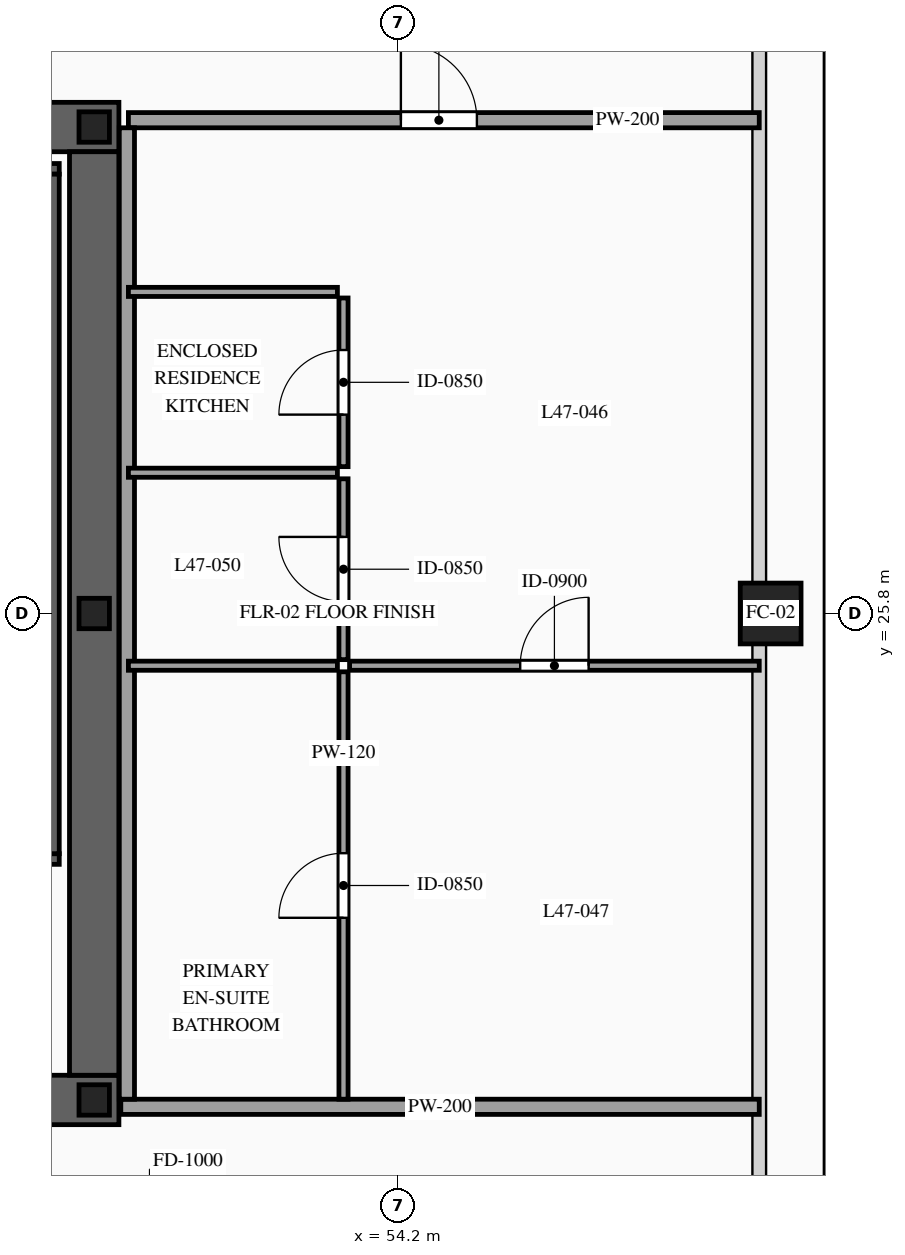
"""IFC4 building model, lengths in metres.
Left out: names, types, materials, properties, quantities, classifications, styles, units other than length and angle.
Written with IfcOpenShell. Run it as: python <this file> out.ifc"""

import sys

from ifc_helpers import new_model, si_unit, direction, frame, frame_2d, origin, origin_2d, place, context, subcontext, project, spatial, rectangle, hollow_rectangle, i_section, extrude, source, transform, mapped, element, fill, save


model = new_model("IFC4")
c1 = context("Model", 3, precision=1e-05, world=origin(), true_north=direction((0.0, 1.0)))
c2 = subcontext(c1, "Body", "Model", "MODEL_VIEW")
j1 = project(units=[si_unit("LENGTHUNIT", "METRE"), si_unit("PLANEANGLEUNIT", "RADIAN")], contexts=[c1])
p1 = place(None, origin())
s1 = spatial("IfcSite", under=j1, at=p1, CompositionType="ELEMENT")
p2 = place(p1, origin())
s2 = spatial("IfcBuilding", under=s1, at=p2, CompositionType="ELEMENT")
p3 = place(p2, frame((0.0, 0.0, 181.0)))
s3 = spatial("IfcBuildingStorey", under=s2, at=p3, CompositionType="ELEMENT", Elevation=181.0)
p4 = place(p3, frame((23.475, 19.4, 0.0), z_axis=(0.0, 0.0, 1.0), x_axis=(1.0, 0.0, 0.0)))
e1 = element("IfcWall", 1, at=p4, inside=s3, PredefinedType="SHEAR", context=c2, shape_type="SweptSolid", body=[
    extrude(rectangle(XDim=27.05, YDim=0.65, at=frame_2d((13.525, 0.0))), origin(), (0.0, 0.0, 1.0), 3.5),
])
p5 = place(p4, frame((1.975, 0.0, 0.0)))
e2 = element("IfcOpeningElement", 2, at=p5, cuts=e1, PredefinedType="OPENING", context=c2, shape_type="SweptSolid", body=[
    extrude(rectangle(XDim=1.1, YDim=2.2, at=frame_2d((0.55, 1.1))), frame((0.0, 0.34, 0.0), z_axis=(0.0, -1.0, 0.0), x_axis=(1.0, 0.0, 0.0)), (0.0, 0.0, 1.0), 0.68),
])
p6 = place(p4, frame((9.875, 0.0, 0.0)))
e3 = element("IfcOpeningElement", 3, at=p6, cuts=e1, PredefinedType="OPENING", context=c2, shape_type="SweptSolid", body=[
    extrude(rectangle(XDim=1.1, YDim=2.2, at=frame_2d((0.55, 1.1))), frame((0.0, 0.34, 0.0), z_axis=(0.0, -1.0, 0.0), x_axis=(1.0, 0.0, 0.0)), (0.0, 0.0, 1.0), 0.68),
])
p7 = place(p4, frame((23.075, 0.0, 0.0)))
e4 = element("IfcOpeningElement", 4, at=p7, cuts=e1, PredefinedType="OPENING", context=c2, shape_type="SweptSolid", body=[
    extrude(rectangle(XDim=1.1, YDim=2.2, at=frame_2d((0.55, 1.1))), frame((0.0, 0.34, 0.0), z_axis=(0.0, -1.0, 0.0), x_axis=(1.0, 0.0, 0.0)), (0.0, 0.0, 1.0), 0.68),
])
p8 = place(p4, frame((19.695, 0.0, 0.0)))
e5 = element("IfcOpeningElement", 5, at=p8, cuts=e1, PredefinedType="OPENING", context=c2, shape_type="SweptSolid", body=[
    extrude(rectangle(XDim=0.9, YDim=2.15, at=frame_2d((0.45, 1.075))), frame((0.0, 0.34, 0.0), z_axis=(0.0, -1.0, 0.0), x_axis=(1.0, 0.0, 0.0)), (0.0, 0.0, 1.0), 0.68),
])
p9 = place(p4, frame((18.255, 0.0, 0.0)))
e6 = element("IfcOpeningElement", 6, at=p9, cuts=e1, PredefinedType="OPENING", context=c2, shape_type="SweptSolid", body=[
    extrude(rectangle(XDim=0.9, YDim=2.15, at=frame_2d((0.45, 1.075))), frame((0.0, 0.34, 0.0), z_axis=(0.0, -1.0, 0.0), x_axis=(1.0, 0.0, 0.0)), (0.0, 0.0, 1.0), 0.68),
])
p10 = place(p3, frame((23.475, 32.2, 0.0), z_axis=(0.0, 0.0, 1.0), x_axis=(1.0, 0.0, 0.0)))
e7 = element("IfcWall", 7, at=p10, inside=s3, PredefinedType="SHEAR", context=c2, shape_type="SweptSolid", body=[
    extrude(rectangle(XDim=27.05, YDim=0.65, at=frame_2d((13.525, 0.0))), origin(), (0.0, 0.0, 1.0), 3.5),
])
p11 = place(p10, frame((4.595, 0.0, 0.0)))
e8 = element("IfcOpeningElement", 8, at=p11, cuts=e7, PredefinedType="OPENING", context=c2, shape_type="SweptSolid", body=[
    extrude(rectangle(XDim=0.9, YDim=2.15, at=frame_2d((0.45, 1.075))), frame((0.0, 0.34, 0.0), z_axis=(0.0, -1.0, 0.0), x_axis=(1.0, 0.0, 0.0)), (0.0, 0.0, 1.0), 0.68),
])
p12 = place(p10, frame((9.875, 0.0, 0.0)))
e9 = element("IfcOpeningElement", 9, at=p12, cuts=e7, PredefinedType="OPENING", context=c2, shape_type="SweptSolid", body=[
    extrude(rectangle(XDim=1.1, YDim=2.2, at=frame_2d((0.55, 1.1))), frame((0.0, 0.34, 0.0), z_axis=(0.0, -1.0, 0.0), x_axis=(1.0, 0.0, 0.0)), (0.0, 0.0, 1.0), 0.68),
])
p13 = place(p10, frame((15.725, 0.0, 0.0)))
e10 = element("IfcOpeningElement", 10, at=p13, cuts=e7, PredefinedType="OPENING", context=c2, shape_type="SweptSolid", body=[
    extrude(rectangle(XDim=1.1, YDim=2.2, at=frame_2d((0.55, 1.1))), frame((0.0, 0.34, 0.0), z_axis=(0.0, -1.0, 0.0), x_axis=(1.0, 0.0, 0.0)), (0.0, 0.0, 1.0), 0.68),
])
p14 = place(p10, frame((19.695, 0.0, 0.0)))
e11 = element("IfcOpeningElement", 11, at=p14, cuts=e7, PredefinedType="OPENING", context=c2, shape_type="SweptSolid", body=[
    extrude(rectangle(XDim=0.9, YDim=2.15, at=frame_2d((0.45, 1.075))), frame((0.0, 0.34, 0.0), z_axis=(0.0, -1.0, 0.0), x_axis=(1.0, 0.0, 0.0)), (0.0, 0.0, 1.0), 0.68),
])
m1 = source(origin(), c2, "Body", "SweptSolid", [
    extrude(rectangle(XDim=12.15, YDim=0.65, at=frame_2d((6.075, 0.0))), origin(), (0.0, 0.0, 1.0), 3.5),
])
p15 = place(p3, frame((50.2, 19.725, 0.0), z_axis=(0.0, 0.0, 1.0), x_axis=(0.0, 1.0, 0.0)))
e12 = element("IfcWall", 12, at=p15, inside=s3, PredefinedType="SHEAR", context=c2, shape_type="MappedRepresentation", body=[
    mapped(m1, transform((0.0, 0.0, 0.0), scale=1.0)),
])
m2 = source(origin(), c2, "Body", "SweptSolid", [
    extrude(i_section(OverallWidth=0.4, OverallDepth=0.4, WebThickness=0.013, FlangeThickness=0.021, at=origin_2d()), origin(), (0.0, 0.0, 1.0), 3.5),
])
for number, where, z_axis, x_axis in (
    (13, (50.2, 19.4, 0.0), (0.0, 0.0, 1.0), (1.0, 0.0, 0.0)),
    (14, (50.2, 25.8, 0.0), (0.0, 0.0, 1.0), (1.0, 0.0, 0.0)),
    (15, (50.2, 32.2, 0.0), (0.0, 0.0, 1.0), (1.0, 0.0, 0.0)),
):
    element("IfcColumn", number, at=place(p3, frame(where, z_axis=z_axis, x_axis=x_axis)), inside=s3, PredefinedType="COLUMN", context=c2, shape_type="MappedRepresentation", body=[
        mapped(m2, transform((0.0, 0.0, 0.0), scale=1.0)),
    ])
m3 = source(origin(), c2, "Body", "SweptSolid", [
    extrude(hollow_rectangle(XDim=0.8, YDim=0.8, WallThickness=0.036, at=origin_2d()), origin(), (0.0, 0.0, 1.0), 3.5),
])
p16 = place(p3, frame((59.1, 25.8, 0.0), z_axis=(0.0, 0.0, 1.0), x_axis=(1.0, 0.0, 0.0)))
e16 = element("IfcColumn", 16, at=p16, inside=s3, PredefinedType="COLUMN", context=c2, shape_type="MappedRepresentation", body=[
    mapped(m3, transform((0.0, 0.0, 0.0), scale=1.0)),
])
p17 = place(p3, frame((46.46, 22.57, 0.0), z_axis=(0.0, 0.0, 1.0), x_axis=(1.0, 0.0, 0.0)))
e17 = element("IfcWall", 17, at=p17, inside=s3, PredefinedType="SOLIDWALL", context=c2, shape_type="SweptSolid", body=[
    extrude(rectangle(XDim=3.28, YDim=0.14, at=frame_2d((1.64, 0.0))), origin(), (0.0, 0.0, 1.0), 3.28),
])
p18 = place(p17, frame((1.09, 0.0, 0.0)))
e18 = element("IfcOpeningElement", 18, at=p18, cuts=e17, PredefinedType="OPENING", context=c2, shape_type="SweptSolid", body=[
    extrude(rectangle(XDim=1.1, YDim=2.2, at=frame_2d((0.55, 1.1))), frame((0.0, 0.085, 0.0), z_axis=(0.0, -1.0, 0.0), x_axis=(1.0, 0.0, 0.0)), (0.0, 0.0, 1.0), 0.17),
])
m4 = source(origin(), c2, "Body", "SweptSolid", [
    extrude(rectangle(XDim=3.28, YDim=0.14, at=frame_2d((1.64, 0.0))), origin(), (0.0, 0.0, 1.0), 3.28),
])
p19 = place(p3, frame((46.46, 31.65, 0.0), z_axis=(0.0, 0.0, 1.0), x_axis=(1.0, 0.0, 0.0)))
e19 = element("IfcWall", 19, at=p19, inside=s3, PredefinedType="SOLIDWALL", context=c2, shape_type="MappedRepresentation", body=[
    mapped(m4, transform((0.0, 0.0, 0.0), scale=1.0)),
])
m5 = source(origin(), c2, "Body", "SweptSolid", [
    extrude(rectangle(XDim=8.94, YDim=0.14, at=frame_2d((4.47, 0.0))), origin(), (0.0, 0.0, 1.0), 3.28),
])
p20 = place(p3, frame((49.67, 22.64, 0.0), z_axis=(0.0, 0.0, 1.0), x_axis=(0.0, 1.0, 0.0)))
e20 = element("IfcWall", 20, at=p20, inside=s3, PredefinedType="SOLIDWALL", context=c2, shape_type="MappedRepresentation", body=[
    mapped(m5, transform((0.0, 0.0, 0.0), scale=1.0)),
])
p21 = place(p3, frame((50.65, 32.29, 0.0), z_axis=(0.0, 0.0, 1.0), x_axis=(1.0, 0.0, 0.0)))
e21 = element("IfcWall", 21, at=p21, inside=s3, PredefinedType="PARTITIONING", context=c2, shape_type="SweptSolid", body=[
    extrude(rectangle(XDim=8.3, YDim=0.2, at=frame_2d((4.15, 0.0))), origin(), (0.0, 0.0, 1.0), 2.775),
])
p22 = place(p21, frame((3.585, 0.0, 0.0)))
e22 = element("IfcOpeningElement", 22, at=p22, cuts=e21, PredefinedType="OPENING", context=c2, shape_type="SweptSolid", body=[
    extrude(rectangle(XDim=1.0, YDim=2.2, at=frame_2d((0.5, 1.1))), frame((0.0, 0.115, 0.0), z_axis=(0.0, -1.0, 0.0), x_axis=(1.0, 0.0, 0.0)), (0.0, 0.0, 1.0), 0.23),
])
m6 = source(origin(), c2, "Body", "SweptSolid", [
    extrude(rectangle(XDim=8.4, YDim=0.2, at=frame_2d((4.2, 0.0))), origin(), (0.0, 0.0, 1.0), 2.775),
])
p23 = place(p3, frame((50.55, 19.31, 0.0), z_axis=(0.0, 0.0, 1.0), x_axis=(1.0, 0.0, 0.0)))
e23 = element("IfcWall", 23, at=p23, inside=s3, PredefinedType="PARTITIONING", context=c2, shape_type="MappedRepresentation", body=[
    mapped(m6, transform((0.0, 0.0, 0.0), scale=1.0)),
])
m7 = source(origin(), c2, "Body", "SweptSolid", [
    extrude(rectangle(XDim=12.78, YDim=0.2, at=frame_2d((6.39, 0.0))), origin(), (0.0, 0.0, 1.0), 3.28),
])
p24 = place(p3, frame((50.63, 19.41, 0.0), z_axis=(0.0, 0.0, 1.0), x_axis=(0.0, 1.0, 0.0)))
e24 = element("IfcWall", 24, at=p24, inside=s3, PredefinedType="PARTITIONING", context=c2, shape_type="MappedRepresentation", body=[
    mapped(m7, transform((0.0, 0.0, 0.0), scale=1.0)),
])
m8 = source(origin(), c2, "Body", "SweptSolid", [
    extrude(rectangle(XDim=2.75, YDim=0.12, at=frame_2d((1.375, 0.0))), origin(), (0.0, 0.0, 1.0), 3.28),
])
for number, where, z_axis, x_axis in (
    (25, (50.65, 25.113, 0.0), (0.0, 0.0, 1.0), (1.0, 0.0, 0.0)),
    (26, (50.65, 27.652, 0.0), (0.0, 0.0, 1.0), (1.0, 0.0, 0.0)),
):
    element("IfcWall", number, at=place(p3, frame(where, z_axis=z_axis, x_axis=x_axis)), inside=s3, PredefinedType="PARTITIONING", context=c2, shape_type="MappedRepresentation", body=[
        mapped(m8, transform((0.0, 0.0, 0.0), scale=1.0)),
    ])
p25 = place(p3, frame((53.48, 25.193, 0.0), z_axis=(0.0, 0.0, 1.0), x_axis=(0.0, 1.0, 0.0)))
e27 = element("IfcWall", 27, at=p25, inside=s3, PredefinedType="PARTITIONING", context=c2, shape_type="SweptSolid", body=[
    extrude(rectangle(XDim=2.379, YDim=0.12, at=frame_2d((1.189, 0.0))), origin(), (0.0, 0.0, 1.0), 3.28),
])
p26 = place(p25, frame((0.764, 0.0, 0.0)))
e28 = element("IfcOpeningElement", 28, at=p26, cuts=e27, PredefinedType="OPENING", context=c2, shape_type="SweptSolid", body=[
    extrude(rectangle(XDim=0.85, YDim=2.1, at=frame_2d((0.425, 1.05))), frame((0.0, 0.075, 0.0), z_axis=(0.0, -1.0, 0.0), x_axis=(1.0, 0.0, 0.0)), (0.0, 0.0, 1.0), 0.15),
])
p27 = place(p3, frame((50.65, 30.031, 0.0), z_axis=(0.0, 0.0, 1.0), x_axis=(1.0, 0.0, 0.0)))
e29 = element("IfcWall", 29, at=p27, inside=s3, PredefinedType="PARTITIONING", context=c2, shape_type="MappedRepresentation", body=[
    mapped(m8, transform((0.0, 0.0, 0.0), scale=1.0)),
])
p28 = place(p3, frame((53.48, 27.732, 0.0), z_axis=(0.0, 0.0, 1.0), x_axis=(0.0, 1.0, 0.0)))
e30 = element("IfcWall", 30, at=p28, inside=s3, PredefinedType="PARTITIONING", context=c2, shape_type="SweptSolid", body=[
    extrude(rectangle(XDim=2.219, YDim=0.12, at=frame_2d((1.109, 0.0))), origin(), (0.0, 0.0, 1.0), 3.28),
])
p29 = place(p28, frame((0.685, 0.0, 0.0)))
e31 = element("IfcOpeningElement", 31, at=p29, cuts=e30, PredefinedType="OPENING", context=c2, shape_type="SweptSolid", body=[
    extrude(rectangle(XDim=0.85, YDim=2.1, at=frame_2d((0.425, 1.05))), frame((0.0, 0.075, 0.0), z_axis=(0.0, -1.0, 0.0), x_axis=(1.0, 0.0, 0.0)), (0.0, 0.0, 1.0), 0.15),
])
p30 = place(p3, frame((53.56, 25.113, 0.0), z_axis=(0.0, 0.0, 1.0), x_axis=(1.0, 0.0, 0.0)))
e32 = element("IfcWall", 32, at=p30, inside=s3, PredefinedType="PARTITIONING", context=c2, shape_type="SweptSolid", body=[
    extrude(rectangle(XDim=5.39, YDim=0.12, at=frame_2d((2.695, 0.0))), origin(), (0.0, 0.0, 1.0), 3.28),
])
p31 = place(p30, frame((2.245, 0.0, 0.0)))
e33 = element("IfcOpeningElement", 33, at=p31, cuts=e32, PredefinedType="OPENING", context=c2, shape_type="SweptSolid", body=[
    extrude(rectangle(XDim=0.9, YDim=2.15, at=frame_2d((0.45, 1.075))), frame((0.0, 0.075, 0.0), z_axis=(0.0, -1.0, 0.0), x_axis=(1.0, 0.0, 0.0)), (0.0, 0.0, 1.0), 0.15),
])
p32 = place(p3, frame((53.48, 19.41, 0.0), z_axis=(0.0, 0.0, 1.0), x_axis=(0.0, 1.0, 0.0)))
e34 = element("IfcWall", 34, at=p32, inside=s3, PredefinedType="PARTITIONING", context=c2, shape_type="SweptSolid", body=[
    extrude(rectangle(XDim=5.623, YDim=0.12, at=frame_2d((2.812, 0.0))), origin(), (0.0, 0.0, 1.0), 3.28),
])
p33 = place(p32, frame((2.386, 0.0, 0.0)))
e35 = element("IfcOpeningElement", 35, at=p33, cuts=e34, PredefinedType="OPENING", context=c2, shape_type="SweptSolid", body=[
    extrude(rectangle(XDim=0.85, YDim=2.1, at=frame_2d((0.425, 1.05))), frame((0.0, 0.075, 0.0), z_axis=(0.0, -1.0, 0.0), x_axis=(1.0, 0.0, 0.0)), (0.0, 0.0, 1.0), 0.15),
])
m9 = source(origin(), c2, "Body", "SweptSolid", [
    extrude(rectangle(XDim=1.0, YDim=2.2, at=frame_2d((0.5, 1.1))), frame((0.0, 0.025, 0.0), z_axis=(0.0, -1.0, 0.0), x_axis=(1.0, 0.0, 0.0)), (0.0, 0.0, 1.0), 0.05),
])
p34 = place(p22, origin())
e36 = element("IfcDoor", 36, at=p34, inside=s3, OperationType="SINGLE_SWING_LEFT", PredefinedType="DOOR", context=c2, shape_type="MappedRepresentation", body=[
    mapped(m9, transform((0.0, 0.0, 0.0), scale=1.0)),
])
fill(e22, e36)
m10 = source(origin(), c2, "Body", "SweptSolid", [
    extrude(rectangle(XDim=0.85, YDim=2.1, at=frame_2d((0.425, 1.05))), frame((0.0, 0.025, 0.0), z_axis=(0.0, -1.0, 0.0), x_axis=(1.0, 0.0, 0.0)), (0.0, 0.0, 1.0), 0.05),
])
p35 = place(p26, origin())
e37 = element("IfcDoor", 37, at=p35, inside=s3, OperationType="SINGLE_SWING_RIGHT", PredefinedType="DOOR", context=c2, shape_type="MappedRepresentation", body=[
    mapped(m10, transform((0.0, 0.0, 0.0), scale=1.0)),
])
fill(e28, e37)
p36 = place(p29, origin())
e38 = element("IfcDoor", 38, at=p36, inside=s3, OperationType="SINGLE_SWING_LEFT", PredefinedType="DOOR", context=c2, shape_type="MappedRepresentation", body=[
    mapped(m10, transform((0.0, 0.0, 0.0), scale=1.0)),
])
fill(e31, e38)
m11 = source(origin(), c2, "Body", "SweptSolid", [
    extrude(rectangle(XDim=0.9, YDim=2.15, at=frame_2d((0.45, 1.075))), frame((0.0, 0.025, 0.0), z_axis=(0.0, -1.0, 0.0), x_axis=(1.0, 0.0, 0.0)), (0.0, 0.0, 1.0), 0.05),
])
p37 = place(p31, origin())
e39 = element("IfcDoor", 39, at=p37, inside=s3, OperationType="SINGLE_SWING_RIGHT", PredefinedType="DOOR", context=c2, shape_type="MappedRepresentation", body=[
    mapped(m11, transform((0.0, 0.0, 0.0), scale=1.0)),
])
fill(e33, e39)
p38 = place(p33, origin())
e40 = element("IfcDoor", 40, at=p38, inside=s3, OperationType="SINGLE_SWING_LEFT", PredefinedType="DOOR", context=c2, shape_type="MappedRepresentation", body=[
    mapped(m10, transform((0.0, 0.0, 0.0), scale=1.0)),
])
fill(e35, e40)
save(model, sys.argv[1])
